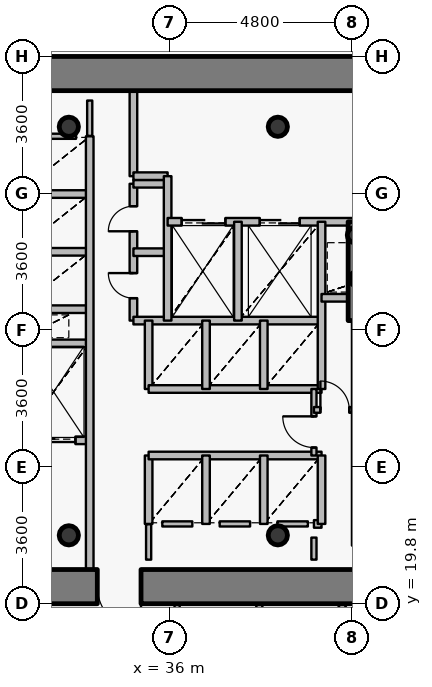
"""IFC4 building model, lengths in metres.
Left out: names, types, materials, properties, quantities, classifications, styles, units other than length and angle.
Written with IfcOpenShell. Run it as: python <this file> out.ifc"""

import sys

from ifc_helpers import new_model, si_unit, direction, frame, frame_2d, origin, origin_2d, place, context, subcontext, project, spatial, rectangle, hollow_circle, extrude, source, transform, mapped, element, fill, save


model = new_model("IFC4")
c1 = context("Model", 3, precision=1e-05, world=origin(), true_north=direction((0.0, 1.0)))
c2 = subcontext(c1, "Body", "Model", "MODEL_VIEW")
j1 = project(units=[si_unit("LENGTHUNIT", "METRE"), si_unit("PLANEANGLEUNIT", "RADIAN")], contexts=[c1])
p1 = place(None, origin())
s1 = spatial("IfcSite", under=j1, at=p1, CompositionType="ELEMENT")
p2 = place(p1, origin())
s2 = spatial("IfcBuilding", under=s1, at=p2, CompositionType="ELEMENT")
p3 = place(p2, frame((0.0, 0.0, 10.2)))
s3 = spatial("IfcBuildingStorey", under=s2, at=p3, CompositionType="ELEMENT", Elevation=10.2)
for number, where, z_axis, x_axis in (
    (1, (33.35, 21.6, 0.0), (0.0, 0.0, 1.0), (1.0, 0.0, 0.0)),
    (2, (38.85, 21.6, 0.0), (0.0, 0.0, 1.0), (1.0, 0.0, 0.0)),
    (3, (38.85, 32.35, 0.0), (0.0, 0.0, 1.0), (1.0, 0.0, 0.0)),
    (4, (33.35, 32.35, 0.0), (0.0, 0.0, 1.0), (1.0, 0.0, 0.0)),
):
    element("IfcColumn", number, at=place(p3, frame(where, z_axis=z_axis, x_axis=x_axis)), inside=s3, PredefinedType="COLUMN", context=c2, shape_type="SweptSolid", body=[
        extrude(hollow_circle(Radius=0.254, WallThickness=0.02, at=origin_2d()), origin(), (0.0, 0.0, 1.0), 4.2),
    ])
for number, where, z_axis, x_axis in (
    (5, (40.95, 28.35, 0.0), (0.0, 0.0, 1.0), (1.0, 0.0, 0.0)),
    (6, (40.88, 29.5, 0.0), (0.0, 0.0, 1.0), (1.0, 0.0, 0.0)),
):
    element("IfcColumn", number, at=place(p3, frame(where, z_axis=z_axis, x_axis=x_axis)), inside=s3, PredefinedType="COLUMN", context=c2, shape_type="SweptSolid", body=[
        extrude(hollow_circle(Radius=0.203, WallThickness=0.016, at=origin_2d()), origin(), (0.0, 0.0, 1.0), 4.2),
    ])
p4 = place(p3, frame((26.75, 33.75, 0.0), z_axis=(0.0, 0.0, 1.0), x_axis=(1.0, 0.0, 0.0)))
e7 = element("IfcWall", 7, at=p4, inside=s3, PredefinedType="SHEAR", context=c2, shape_type="SweptSolid", body=[
    extrude(rectangle(XDim=18.5, YDim=0.9, at=frame_2d((9.25, 0.0))), origin(), (0.0, 0.0, 1.0), 3.35),
])
p5 = place(p3, frame((45.25, 20.25, 0.0), z_axis=(0.0, 0.0, 1.0), x_axis=(-1.0, 0.0, 0.0)))
e8 = element("IfcWall", 8, at=p5, inside=s3, PredefinedType="SHEAR", context=c2, shape_type="SweptSolid", body=[
    extrude(rectangle(XDim=18.5, YDim=0.9, at=frame_2d((9.25, 0.0))), origin(), (0.0, 0.0, 1.0), 3.35),
])
p6 = place(p5, frame((10.0, 0.0, 0.0)))
e9 = element("IfcOpeningElement", 9, at=p6, cuts=e8, PredefinedType="OPENING", context=c2, shape_type="SweptSolid", body=[
    extrude(rectangle(XDim=1.15, YDim=2.15, at=origin_2d()), frame((0.575, 0.46, 1.075), z_axis=(0.0, -1.0, 0.0), x_axis=(1.0, 0.0, 0.0)), (0.0, 0.0, 1.0), 0.92),
])
p7 = place(p3, frame((40.9, 27.25, 0.0), z_axis=(0.0, 0.0, 1.0), x_axis=(0.0, 1.0, 0.0)))
e10 = element("IfcWall", 10, at=p7, inside=s3, PredefinedType="SHEAR", context=c2, shape_type="SweptSolid", body=[
    extrude(rectangle(XDim=2.6, YDim=0.4, at=frame_2d((1.3, 0.0))), origin(), (0.0, 0.0, 1.0), 3.5),
])
p8 = place(p3, frame((32.0, 24.1, 0.0), z_axis=(0.0, 0.0, 1.0), x_axis=(1.0, 0.0, 0.0)))
e11 = element("IfcWall", 11, at=p8, inside=s3, PredefinedType="PARTITIONING", context=c2, shape_type="SweptSolid", body=[
    extrude(rectangle(XDim=1.9, YDim=0.2, at=frame_2d((0.95, 0.0))), origin(), (0.0, 0.0, 1.0), 3.485),
])
p9 = place(p8, frame((0.375, 0.0, 0.0)))
e12 = element("IfcOpeningElement", 12, at=p9, cuts=e11, PredefinedType="OPENING", context=c2, shape_type="SweptSolid", body=[
    extrude(rectangle(XDim=1.15, YDim=2.15, at=origin_2d()), frame((0.575, 0.11, 1.075), z_axis=(0.0, -1.0, 0.0), x_axis=(1.0, 0.0, 0.0)), (0.0, 0.0, 1.0), 0.22),
])
for number, where, z_axis, x_axis in (
    (13, (32.0, 26.65, 0.0), (0.0, 0.0, 1.0), (1.0, 0.0, 0.0)),
    (14, (32.0, 27.55, 0.0), (0.0, 0.0, 1.0), (1.0, 0.0, 0.0)),
    (15, (32.0, 29.06, 0.0), (0.0, 0.0, 1.0), (1.0, 0.0, 0.0)),
    (16, (32.0, 30.58, 0.0), (0.0, 0.0, 1.0), (1.0, 0.0, 0.0)),
):
    element("IfcWall", number, at=place(p3, frame(where, z_axis=z_axis, x_axis=x_axis)), inside=s3, PredefinedType="PARTITIONING", context=c2, shape_type="SweptSolid", body=[
        extrude(rectangle(XDim=1.9, YDim=0.2, at=frame_2d((0.95, 0.0))), origin(), (0.0, 0.0, 1.0), 3.485),
    ])
p10 = place(p3, frame((33.9, 20.7, 0.0), z_axis=(0.0, 0.0, 1.0), x_axis=(0.0, 1.0, 0.0)))
e17 = element("IfcWall", 17, at=p10, inside=s3, PredefinedType="PARTITIONING", context=c2, shape_type="SweptSolid", body=[
    extrude(rectangle(XDim=11.4, YDim=0.2, at=frame_2d((5.7, 0.0))), origin(), (0.0, 0.0, 1.0), 3.485),
])
p11 = place(p3, frame((35.05, 27.25, 0.0), z_axis=(0.0, 0.0, 1.0), x_axis=(0.0, 1.0, 0.0)))
e18 = element("IfcWall", 18, at=p11, inside=s3, PredefinedType="PARTITIONING", context=c2, shape_type="SweptSolid", body=[
    extrude(rectangle(XDim=3.6, YDim=0.2, at=frame_2d((1.8, 0.0))), origin(), (0.0, 0.0, 1.0), 3.9),
])
p12 = place(p11, frame((0.59, 0.0, 0.0)))
e19 = element("IfcOpeningElement", 19, at=p12, cuts=e18, PredefinedType="OPENING", context=c2, shape_type="SweptSolid", body=[
    extrude(rectangle(XDim=0.66, YDim=2.05, at=origin_2d()), frame((0.33, 0.11, 1.025), z_axis=(0.0, -1.0, 0.0), x_axis=(1.0, 0.0, 0.0)), (0.0, 0.0, 1.0), 0.22),
])
p13 = place(p11, frame((2.35, 0.0, 0.0)))
e20 = element("IfcOpeningElement", 20, at=p13, cuts=e18, PredefinedType="OPENING", context=c2, shape_type="SweptSolid", body=[
    extrude(rectangle(XDim=0.66, YDim=2.05, at=origin_2d()), frame((0.33, 0.11, 1.025), z_axis=(0.0, -1.0, 0.0), x_axis=(1.0, 0.0, 0.0)), (0.0, 0.0, 1.0), 0.22),
])
p14 = place(p3, frame((35.05, 27.25, 0.0), z_axis=(0.0, 0.0, 1.0), x_axis=(1.0, 0.0, 0.0)))
e21 = element("IfcWall", 21, at=p14, inside=s3, PredefinedType="PARTITIONING", context=c2, shape_type="SweptSolid", body=[
    extrude(rectangle(XDim=4.95, YDim=0.2, at=frame_2d((2.475, 0.0))), origin(), (0.0, 0.0, 1.0), 3.485),
])
for number, where, z_axis, x_axis in (
    (22, (35.05, 29.05, 0.0), (0.0, 0.0, 1.0), (1.0, 0.0, 0.0)),
    (23, (35.05, 30.85, 0.0), (0.0, 0.0, 1.0), (1.0, 0.0, 0.0)),
):
    element("IfcWall", number, at=place(p3, frame(where, z_axis=z_axis, x_axis=x_axis)), inside=s3, PredefinedType="PARTITIONING", context=c2, shape_type="SweptSolid", body=[
        extrude(rectangle(XDim=0.9, YDim=0.2, at=frame_2d((0.45, 0.0))), origin(), (0.0, 0.0, 1.0), 3.9),
    ])
p15 = place(p3, frame((35.05, 31.05, 0.0), z_axis=(0.0, 0.0, 1.0), x_axis=(0.0, 1.0, 0.0)))
e24 = element("IfcWall", 24, at=p15, inside=s3, PredefinedType="PARTITIONING", context=c2, shape_type="SweptSolid", body=[
    extrude(rectangle(XDim=2.25, YDim=0.2, at=frame_2d((1.125, 0.0))), origin(), (0.0, 0.0, 1.0), 3.485),
])
p16 = place(p3, frame((35.05, 31.05, 0.0), z_axis=(0.0, 0.0, 1.0), x_axis=(1.0, 0.0, 0.0)))
e25 = element("IfcWall", 25, at=p16, inside=s3, PredefinedType="PARTITIONING", context=c2, shape_type="SweptSolid", body=[
    extrude(rectangle(XDim=0.9, YDim=0.2, at=frame_2d((0.45, 0.0))), origin(), (0.0, 0.0, 1.0), 3.9),
])
p17 = place(p3, frame((35.45, 21.9, 0.0), z_axis=(0.0, 0.0, 1.0), x_axis=(0.0, 1.0, 0.0)))
e26 = element("IfcWall", 26, at=p17, inside=s3, PredefinedType="PARTITIONING", context=c2, shape_type="SweptSolid", body=[
    extrude(rectangle(XDim=1.8, YDim=0.2, at=frame_2d((0.9, 0.0))), origin(), (0.0, 0.0, 1.0), 3.9),
])
p18 = place(p3, frame((35.45, 23.7, 0.0), z_axis=(0.0, 0.0, 1.0), x_axis=(1.0, 0.0, 0.0)))
e27 = element("IfcWall", 27, at=p18, inside=s3, PredefinedType="PARTITIONING", context=c2, shape_type="SweptSolid", body=[
    extrude(rectangle(XDim=4.55, YDim=0.2, at=frame_2d((2.275, 0.0))), origin(), (0.0, 0.0, 1.0), 3.485),
])
p19 = place(p3, frame((35.45, 25.45, 0.0), z_axis=(0.0, 0.0, 1.0), x_axis=(0.0, 1.0, 0.0)))
e28 = element("IfcWall", 28, at=p19, inside=s3, PredefinedType="PARTITIONING", context=c2, shape_type="SweptSolid", body=[
    extrude(rectangle(XDim=1.8, YDim=0.2, at=frame_2d((0.9, 0.0))), origin(), (0.0, 0.0, 1.0), 3.9),
])
p20 = place(p3, frame((35.45, 25.45, 0.0), z_axis=(0.0, 0.0, 1.0), x_axis=(1.0, 0.0, 0.0)))
e29 = element("IfcWall", 29, at=p20, inside=s3, PredefinedType="PARTITIONING", context=c2, shape_type="SweptSolid", body=[
    extrude(rectangle(XDim=4.55, YDim=0.2, at=frame_2d((2.275, 0.0))), origin(), (0.0, 0.0, 1.0), 3.485),
])
p21 = place(p3, frame((35.95, 27.25, 0.0), z_axis=(0.0, 0.0, 1.0), x_axis=(0.0, 1.0, 0.0)))
e30 = element("IfcWall", 30, at=p21, inside=s3, PredefinedType="PARTITIONING", context=c2, shape_type="SweptSolid", body=[
    extrude(rectangle(XDim=3.8, YDim=0.2, at=frame_2d((1.9, 0.0))), origin(), (0.0, 0.0, 1.0), 3.9),
])
p22 = place(p3, frame((35.95, 29.85, 0.0), z_axis=(0.0, 0.0, 1.0), x_axis=(1.0, 0.0, 0.0)))
e31 = element("IfcWall", 31, at=p22, inside=s3, PredefinedType="PARTITIONING", context=c2, shape_type="SweptSolid", body=[
    extrude(rectangle(XDim=8.49, YDim=0.2, at=frame_2d((4.245, 0.0))), origin(), (0.0, 0.0, 1.0), 3.485),
])
p23 = place(p22, frame((6.1, 0.0, 0.0)))
e32 = element("IfcOpeningElement", 32, at=p23, cuts=e31, PredefinedType="OPENING", context=c2, shape_type="SweptSolid", body=[
    extrude(rectangle(XDim=1.2, YDim=2.15, at=origin_2d()), frame((0.6, 0.11, 1.075), z_axis=(0.0, -1.0, 0.0), x_axis=(1.0, 0.0, 0.0)), (0.0, 0.0, 1.0), 0.22),
])
p24 = place(p22, frame((0.37, 0.0, 0.0)))
e33 = element("IfcOpeningElement", 33, at=p24, cuts=e31, PredefinedType="OPENING", context=c2, shape_type="SweptSolid", body=[
    extrude(rectangle(XDim=1.15, YDim=2.15, at=origin_2d()), frame((0.575, 0.11, 1.075), z_axis=(0.0, -1.0, 0.0), x_axis=(1.0, 0.0, 0.0)), (0.0, 0.0, 1.0), 0.22),
])
p25 = place(p22, frame((2.425, 0.0, 0.0)))
e34 = element("IfcOpeningElement", 34, at=p25, cuts=e31, PredefinedType="OPENING", context=c2, shape_type="SweptSolid", body=[
    extrude(rectangle(XDim=1.05, YDim=2.15, at=origin_2d()), frame((0.525, 0.11, 1.075), z_axis=(0.0, -1.0, 0.0), x_axis=(1.0, 0.0, 0.0)), (0.0, 0.0, 1.0), 0.22),
])
p26 = place(p3, frame((36.2, 17.9, 0.0), z_axis=(0.0, 0.0, 1.0), x_axis=(0.0, 1.0, 0.0)))
e35 = element("IfcWall", 35, at=p26, inside=s3, PredefinedType="PARTITIONING", context=c2, shape_type="SweptSolid", body=[
    extrude(rectangle(XDim=1.9, YDim=0.135, at=frame_2d((0.95, 0.0))), origin(), (0.0, 0.0, 1.0), 3.085),
])
for number, where, z_axis, x_axis in (
    (36, (36.96, 21.9, 0.0), (0.0, 0.0, 1.0), (0.0, 1.0, 0.0)),
    (37, (36.96, 25.45, 0.0), (0.0, 0.0, 1.0), (0.0, 1.0, 0.0)),
):
    element("IfcWall", number, at=place(p3, frame(where, z_axis=z_axis, x_axis=x_axis)), inside=s3, PredefinedType="PARTITIONING", context=c2, shape_type="SweptSolid", body=[
        extrude(rectangle(XDim=1.8, YDim=0.2, at=frame_2d((0.9, 0.0))), origin(), (0.0, 0.0, 1.0), 3.9),
    ])
p27 = place(p3, frame((37.8, 27.25, 0.0), z_axis=(0.0, 0.0, 1.0), x_axis=(0.0, 1.0, 0.0)))
e38 = element("IfcWall", 38, at=p27, inside=s3, PredefinedType="PARTITIONING", context=c2, shape_type="SweptSolid", body=[
    extrude(rectangle(XDim=2.6, YDim=0.2, at=frame_2d((1.3, 0.0))), origin(), (0.0, 0.0, 1.0), 3.9),
])
p28 = place(p3, frame((38.339, 19.8, 0.0), z_axis=(0.0, 0.0, 1.0), x_axis=(0.309020911431, -0.951055243557, 0.0)))
e39 = element("IfcWall", 39, at=p28, inside=s3, PredefinedType="PARTITIONING", context=c2, shape_type="SweptSolid", body=[
    extrude(rectangle(XDim=18.723, YDim=0.15, at=frame_2d((9.362, 0.0))), origin(), (0.0, 0.0, 1.0), 3.285),
])
p29 = place(p28, frame((4.76, 0.0, 0.0)))
e40 = element("IfcOpeningElement", 40, at=p29, cuts=e39, PredefinedType="OPENING", context=c2, shape_type="SweptSolid", body=[
    extrude(rectangle(XDim=0.82, YDim=2.1, at=origin_2d()), frame((0.41, 0.085, 1.05), z_axis=(0.0, -1.0, 0.0), x_axis=(1.0, 0.0, 0.0)), (0.0, 0.0, 1.0), 0.17),
])
p30 = place(p28, frame((13.966, 0.0, 0.0)))
e41 = element("IfcOpeningElement", 41, at=p30, cuts=e39, PredefinedType="OPENING", context=c2, shape_type="SweptSolid", body=[
    extrude(rectangle(XDim=1.05, YDim=2.15, at=origin_2d()), frame((0.525, 0.085, 1.075), z_axis=(0.0, -1.0, 0.0), x_axis=(1.0, 0.0, 0.0)), (0.0, 0.0, 1.0), 0.17),
])
for number, where, z_axis, x_axis in (
    (42, (38.48, 21.9, 0.0), (0.0, 0.0, 1.0), (0.0, 1.0, 0.0)),
    (43, (38.48, 25.45, 0.0), (0.0, 0.0, 1.0), (0.0, 1.0, 0.0)),
):
    element("IfcWall", number, at=place(p3, frame(where, z_axis=z_axis, x_axis=x_axis)), inside=s3, PredefinedType="PARTITIONING", context=c2, shape_type="SweptSolid", body=[
        extrude(rectangle(XDim=1.8, YDim=0.2, at=frame_2d((0.9, 0.0))), origin(), (0.0, 0.0, 1.0), 3.9),
    ])
p31 = place(p3, frame((39.8, 21.9, 0.0), z_axis=(0.0, 0.0, 1.0), x_axis=(1.0, 0.0, 0.0)))
e44 = element("IfcWall", 44, at=p31, inside=s3, PredefinedType="PARTITIONING", context=c2, shape_type="SweptSolid", body=[
    extrude(rectangle(XDim=0.2, YDim=0.2, at=frame_2d((0.1, 0.0))), origin(), (0.0, 0.0, 1.0), 3.9),
])
p32 = place(p3, frame((39.8, 23.7, 0.0), z_axis=(0.0, 0.0, 1.0), x_axis=(0.0, 1.0, 0.0)))
e45 = element("IfcWall", 45, at=p32, inside=s3, PredefinedType="PARTITIONING", context=c2, shape_type="SweptSolid", body=[
    extrude(rectangle(XDim=1.75, YDim=0.135, at=frame_2d((0.875, 0.0))), origin(), (0.0, 0.0, 1.0), 3.9),
])
p33 = place(p32, frame((0.21, 0.0, 0.0)))
e46 = element("IfcOpeningElement", 46, at=p33, cuts=e45, PredefinedType="OPENING", context=c2, shape_type="SweptSolid", body=[
    extrude(rectangle(XDim=0.82, YDim=2.1, at=origin_2d()), frame((0.41, 0.078, 1.05), z_axis=(0.0, -1.0, 0.0), x_axis=(1.0, 0.0, 0.0)), (0.0, 0.0, 1.0), 0.155),
])
p34 = place(p3, frame((39.8, 24.9, 0.0), z_axis=(0.0, 0.0, 1.0), x_axis=(1.0, 0.0, 0.0)))
e47 = element("IfcWall", 47, at=p34, inside=s3, PredefinedType="PARTITIONING", context=c2, shape_type="SweptSolid", body=[
    extrude(rectangle(XDim=1.1, YDim=0.15, at=frame_2d((0.55, 0.0))), origin(), (0.0, 0.0, 1.0), 3.9),
])
p35 = place(p34, frame((0.17, 0.0, 0.0)))
e48 = element("IfcOpeningElement", 48, at=p35, cuts=e47, PredefinedType="OPENING", context=c2, shape_type="SweptSolid", body=[
    extrude(rectangle(XDim=0.76, YDim=2.1, at=origin_2d()), frame((0.38, 0.085, 1.05), z_axis=(0.0, -1.0, 0.0), x_axis=(1.0, 0.0, 0.0)), (0.0, 0.0, 1.0), 0.17),
])
p36 = place(p3, frame((40.0, 21.9, 0.0), z_axis=(0.0, 0.0, 1.0), x_axis=(0.0, 1.0, 0.0)))
e49 = element("IfcWall", 49, at=p36, inside=s3, PredefinedType="PARTITIONING", context=c2, shape_type="SweptSolid", body=[
    extrude(rectangle(XDim=1.8, YDim=0.2, at=frame_2d((0.9, 0.0))), origin(), (0.0, 0.0, 1.0), 3.9),
])
p37 = place(p3, frame((40.0, 25.45, 0.0), z_axis=(0.0, 0.0, 1.0), x_axis=(0.0, 1.0, 0.0)))
e50 = element("IfcWall", 50, at=p37, inside=s3, PredefinedType="PARTITIONING", context=c2, shape_type="SweptSolid", body=[
    extrude(rectangle(XDim=4.4, YDim=0.2, at=frame_2d((2.2, 0.0))), origin(), (0.0, 0.0, 1.0), 3.9),
])
p38 = place(p3, frame((40.0, 27.85, 0.0), z_axis=(0.0, 0.0, 1.0), x_axis=(1.0, 0.0, 0.0)))
e51 = element("IfcWall", 51, at=p38, inside=s3, PredefinedType="PARTITIONING", context=c2, shape_type="SweptSolid", body=[
    extrude(rectangle(XDim=0.9, YDim=0.2, at=frame_2d((0.45, 0.0))), origin(), (0.0, 0.0, 1.0), 3.9),
])
p39 = place(p3, frame((40.499, 19.8, 0.0), z_axis=(0.0, 0.0, 1.0), x_axis=(0.529919953547, -0.848047665425, 0.0)))
e52 = element("IfcWall", 52, at=p39, inside=s3, PredefinedType="PARTITIONING", context=c2, shape_type="SweptSolid", body=[
    extrude(rectangle(XDim=18.893, YDim=0.15, at=frame_2d((9.447, 0.0))), origin(), (0.0, 0.0, 1.0), 3.285),
])
p40 = place(p39, frame((13.906, 0.0, 0.0)))
e53 = element("IfcOpeningElement", 53, at=p40, cuts=e52, PredefinedType="OPENING", context=c2, shape_type="SweptSolid", body=[
    extrude(rectangle(XDim=1.05, YDim=2.15, at=origin_2d()), frame((0.525, 0.085, 1.075), z_axis=(0.0, -1.0, 0.0), x_axis=(1.0, 0.0, 0.0)), (0.0, 0.0, 1.0), 0.17),
])
p41 = place(p3, frame((40.9, 21.33, 0.0), z_axis=(0.0, 0.0, 1.0), x_axis=(0.0, 1.0, 0.0)))
e54 = element("IfcWall", 54, at=p41, inside=s3, PredefinedType="PARTITIONING", context=c2, shape_type="SweptSolid", body=[
    extrude(rectangle(XDim=5.91, YDim=0.2, at=frame_2d((2.955, 0.0))), origin(), (0.0, 0.0, 1.0), 3.435),
])
p42 = place(p3, frame((36.6, 21.9, 0.0), z_axis=(0.0, 0.0, 1.0), x_axis=(-1.0, 0.0, 0.0)))
e55 = element("IfcWall", 55, at=p42, inside=s3, PredefinedType="PARTITIONING", context=c2, shape_type="SweptSolid", body=[
    extrude(rectangle(XDim=0.79, YDim=0.135, at=frame_2d((0.395, 0.0))), origin(), (0.0, 0.0, 1.0), 3.9),
])
p43 = place(p3, frame((38.12, 21.9, 0.0), z_axis=(0.0, 0.0, 1.0), x_axis=(-1.0, 0.0, 0.0)))
e56 = element("IfcWall", 56, at=p43, inside=s3, PredefinedType="PARTITIONING", context=c2, shape_type="SweptSolid", body=[
    extrude(rectangle(XDim=0.8, YDim=0.135, at=frame_2d((0.4, 0.0))), origin(), (0.0, 0.0, 1.0), 3.9),
])
p44 = place(p3, frame((39.64, 21.9, 0.0), z_axis=(0.0, 0.0, 1.0), x_axis=(-1.0, 0.0, 0.0)))
e57 = element("IfcWall", 57, at=p44, inside=s3, PredefinedType="PARTITIONING", context=c2, shape_type="SweptSolid", body=[
    extrude(rectangle(XDim=0.8, YDim=0.135, at=frame_2d((0.4, 0.0))), origin(), (0.0, 0.0, 1.0), 3.485),
])
p45 = place(p3, frame((32.36, 32.1, 0.0), z_axis=(0.0, 0.0, 1.0), x_axis=(1.0, 0.0, 0.0)))
e58 = element("IfcWall", 58, at=p45, inside=s3, PredefinedType="PARTITIONING", context=c2, shape_type="SweptSolid", body=[
    extrude(rectangle(XDim=1.18, YDim=0.135, at=frame_2d((0.59, 0.0))), origin(), (0.0, 0.0, 1.0), 3.485),
])
p46 = place(p3, frame((39.8, 20.96, 0.0), z_axis=(0.0, 0.0, 1.0), x_axis=(0.0, 1.0, 0.0)))
e59 = element("IfcWall", 59, at=p46, inside=s3, PredefinedType="PARTITIONING", context=c2, shape_type="SweptSolid", body=[
    extrude(rectangle(XDim=0.58, YDim=0.135, at=frame_2d((0.29, 0.0))), origin(), (0.0, 0.0, 1.0), 3.435),
])
for number, where, z_axis, x_axis in (
    (60, (35.45, 21.89, 0.0), (0.0, 0.0, 1.0), (0.0, -1.0, 0.0)),
    (61, (33.9, 32.11, 0.0), (0.0, 0.0, 1.0), (0.0, 1.0, 0.0)),
):
    element("IfcWall", number, at=place(p3, frame(where, z_axis=z_axis, x_axis=x_axis)), inside=s3, PredefinedType="PARTITIONING", context=c2, shape_type="SweptSolid", body=[
        extrude(rectangle(XDim=0.93, YDim=0.135, at=frame_2d((0.465, 0.0))), origin(), (0.0, 0.0, 1.0), 3.485),
    ])
m1 = source(origin(), c2, "Body", "SweptSolid", [
    extrude(rectangle(XDim=1.15, YDim=2.15, at=origin_2d()), frame((0.575, 0.025, 1.075), z_axis=(0.0, -1.0, 0.0), x_axis=(1.0, 0.0, 0.0)), (0.0, 0.0, 1.0), 0.05),
])
p47 = place(p6, origin())
e62 = element("IfcDoor", 62, at=p47, inside=s3, OperationType="SINGLE_SWING_LEFT", PredefinedType="DOOR", context=c2, shape_type="MappedRepresentation", body=[
    mapped(m1, transform((0.0, 0.0, 0.0), x_axis=(1.0, 0.0, 0.0), y_axis=(0.0, 1.0, 0.0), z_axis=(0.0, 0.0, 1.0), scale=1.0)),
])
fill(e9, e62)
m2 = source(origin(), c2, "Body", "SweptSolid", [
    extrude(rectangle(XDim=1.15, YDim=2.15, at=origin_2d()), frame((0.575, 0.025, 1.075), z_axis=(0.0, -1.0, 0.0), x_axis=(1.0, 0.0, 0.0)), (0.0, 0.0, 1.0), 0.05),
])
p48 = place(p24, origin())
e63 = element("IfcDoor", 63, at=p48, inside=s3, OperationType="DOUBLE_DOOR_SLIDING", PredefinedType="USERDEFINED", context=c2, shape_type="MappedRepresentation", body=[
    mapped(m2, transform((0.0, 0.0, 0.0), x_axis=(1.0, 0.0, 0.0), y_axis=(0.0, 1.0, 0.0), z_axis=(0.0, 0.0, 1.0), scale=1.0)),
])
fill(e33, e63)
p49 = place(p9, origin())
e64 = element("IfcDoor", 64, at=p49, inside=s3, OperationType="DOUBLE_DOOR_SLIDING", PredefinedType="USERDEFINED", context=c2, shape_type="MappedRepresentation", body=[
    mapped(m2, transform((0.0, 0.0, 0.0), x_axis=(1.0, 0.0, 0.0), y_axis=(0.0, 1.0, 0.0), z_axis=(0.0, 0.0, 1.0), scale=1.0)),
])
fill(e12, e64)
m3 = source(origin(), c2, "Body", "SweptSolid", [
    extrude(rectangle(XDim=1.05, YDim=2.15, at=origin_2d()), frame((0.525, 0.025, 1.075), z_axis=(0.0, -1.0, 0.0), x_axis=(1.0, 0.0, 0.0)), (0.0, 0.0, 1.0), 0.05),
])
p50 = place(p25, origin())
e65 = element("IfcDoor", 65, at=p50, inside=s3, OperationType="DOUBLE_DOOR_SLIDING", PredefinedType="USERDEFINED", context=c2, shape_type="MappedRepresentation", body=[
    mapped(m3, transform((0.0, 0.0, 0.0), x_axis=(1.0, 0.0, 0.0), y_axis=(0.0, 1.0, 0.0), z_axis=(0.0, 0.0, 1.0), scale=1.0)),
])
fill(e34, e65)
m4 = source(origin(), c2, "Body", "SweptSolid", [
    extrude(rectangle(XDim=0.66, YDim=2.05, at=origin_2d()), frame((0.33, 0.025, 1.025), z_axis=(0.0, -1.0, 0.0), x_axis=(1.0, 0.0, 0.0)), (0.0, 0.0, 1.0), 0.05),
])
p51 = place(p12, origin())
e66 = element("IfcDoor", 66, at=p51, inside=s3, OperationType="SINGLE_SWING_RIGHT", PredefinedType="USERDEFINED", context=c2, shape_type="MappedRepresentation", body=[
    mapped(m4, transform((0.0, 0.0, 0.0), x_axis=(1.0, 0.0, 0.0), y_axis=(0.0, 1.0, 0.0), z_axis=(0.0, 0.0, 1.0), scale=1.0)),
])
fill(e19, e66)
p52 = place(p13, origin())
e67 = element("IfcDoor", 67, at=p52, inside=s3, OperationType="SINGLE_SWING_LEFT", PredefinedType="USERDEFINED", context=c2, shape_type="MappedRepresentation", body=[
    mapped(m4, transform((0.0, 0.0, 0.0), x_axis=(1.0, 0.0, 0.0), y_axis=(0.0, 1.0, 0.0), z_axis=(0.0, 0.0, 1.0), scale=1.0)),
])
fill(e20, e67)
m5 = source(origin(), c2, "Body", "SweptSolid", [
    extrude(rectangle(XDim=0.82, YDim=2.1, at=origin_2d()), frame((0.41, 0.025, 1.05), z_axis=(0.0, -1.0, 0.0), x_axis=(1.0, 0.0, 0.0)), (0.0, 0.0, 1.0), 0.05),
])
p53 = place(p33, origin())
e68 = element("IfcDoor", 68, at=p53, inside=s3, OperationType="SINGLE_SWING_RIGHT", PredefinedType="DOOR", context=c2, shape_type="MappedRepresentation", body=[
    mapped(m5, transform((0.0, 0.0, 0.0), x_axis=(1.0, 0.0, 0.0), y_axis=(0.0, 1.0, 0.0), z_axis=(0.0, 0.0, 1.0), scale=1.0)),
])
fill(e46, e68)
m6 = source(origin(), c2, "Body", "SweptSolid", [
    extrude(rectangle(XDim=0.76, YDim=2.1, at=origin_2d()), frame((0.38, 0.025, 1.05), z_axis=(0.0, -1.0, 0.0), x_axis=(1.0, 0.0, 0.0)), (0.0, 0.0, 1.0), 0.05),
])
p54 = place(p35, origin())
e69 = element("IfcDoor", 69, at=p54, inside=s3, OperationType="SINGLE_SWING_LEFT", PredefinedType="DOOR", context=c2, shape_type="MappedRepresentation", body=[
    mapped(m6, transform((0.0, 0.0, 0.0), x_axis=(1.0, 0.0, 0.0), y_axis=(0.0, 1.0, 0.0), z_axis=(0.0, 0.0, 1.0), scale=1.0)),
])
fill(e48, e69)
save(model, sys.argv[1])
